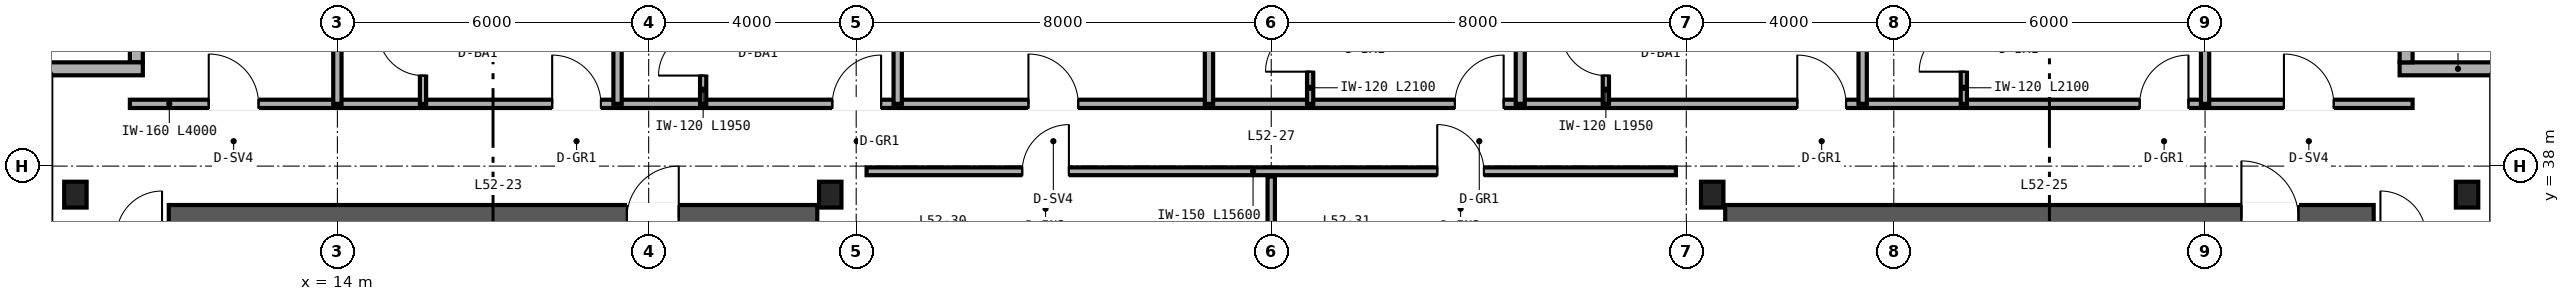
"""IFC4 building model, lengths in metres.
Left out: names, types, materials, properties, quantities, classifications, styles, units other than length and angle.
Written with IfcOpenShell. Run it as: python <this file> out.ifc"""

import sys

from ifc_helpers import new_model, si_unit, direction, frame, frame_2d, origin, origin_2d, place, context, subcontext, project, spatial, rectangle, i_section, extrude, source, transform, mapped, element, fill, save


model = new_model("IFC4")
c1 = context("Model", 3, precision=1e-05, world=origin(), true_north=direction((0.0, 1.0)))
c2 = subcontext(c1, "Body", "Model", "MODEL_VIEW")
j1 = project(units=[si_unit("LENGTHUNIT", "METRE"), si_unit("PLANEANGLEUNIT", "RADIAN")], contexts=[c1])
p1 = place(None, origin())
s1 = spatial("IfcSite", under=j1, at=p1, CompositionType="ELEMENT")
p2 = place(p1, origin())
s2 = spatial("IfcBuilding", under=s1, at=p2, CompositionType="ELEMENT")
p3 = place(p2, frame((0.0, 0.0, 206.4)))
s3 = spatial("IfcBuildingStorey", under=s2, at=p3, CompositionType="ELEMENT", Elevation=206.4)
p4 = place(p3, frame((10.75, 37.0, 0.0), z_axis=(0.0, 0.0, 1.0), x_axis=(1.0, 0.0, 0.0)))
e1 = element("IfcWall", 1, at=p4, inside=s3, PredefinedType="SHEAR", context=c2, shape_type="SweptSolid", body=[
    extrude(rectangle(XDim=12.5, YDim=0.5, at=frame_2d((6.25, 0.0))), origin(), (0.0, 0.0, 1.0), 3.37),
])
p5 = place(p4, frame((8.83, 0.0, 0.0)))
e2 = element("IfcOpeningElement", 2, at=p5, cuts=e1, PredefinedType="OPENING", context=c2, shape_type="SweptSolid", body=[
    extrude(rectangle(XDim=1.0, YDim=2.15, at=frame_2d((0.5, 1.075))), frame((0.0, 0.26, 0.0), z_axis=(0.0, -1.0, 0.0), x_axis=(1.0, 0.0, 0.0)), (0.0, 0.0, 1.0), 0.52),
])
p6 = place(p3, frame((40.75, 37.0, 0.0), z_axis=(0.0, 0.0, 1.0), x_axis=(1.0, 0.0, 0.0)))
e3 = element("IfcWall", 3, at=p6, inside=s3, PredefinedType="SHEAR", context=c2, shape_type="SweptSolid", body=[
    extrude(rectangle(XDim=12.5, YDim=0.5, at=frame_2d((6.25, 0.0))), origin(), (0.0, 0.0, 1.0), 3.37),
])
p7 = place(p6, frame((9.95, 0.0, 0.0)))
e4 = element("IfcOpeningElement", 4, at=p7, cuts=e3, PredefinedType="OPENING", context=c2, shape_type="SweptSolid", body=[
    extrude(rectangle(XDim=1.1, YDim=2.15, at=frame_2d((0.55, 1.075))), frame((0.0, 0.26, 0.0), z_axis=(0.0, -1.0, 0.0), x_axis=(1.0, 0.0, 0.0)), (0.0, 0.0, 1.0), 0.52),
])
m1 = source(origin(), c2, "Body", "SweptSolid", [
    extrude(i_section(OverallWidth=0.432, OverallDepth=0.498, WebThickness=0.056, FlangeThickness=0.089, FilletRadius=0.025, at=origin_2d()), origin(), (0.0, 0.0, 1.0), 3.37),
])
for number, where, z_axis, x_axis in (
    (5, (8.95, 37.45, 0.0), (0.0, 0.0, 1.0), (1.0, 0.0, 0.0)),
    (6, (23.5, 37.45, 0.0), (0.0, 0.0, 1.0), (1.0, 0.0, 0.0)),
    (7, (40.5, 37.45, 0.0), (0.0, 0.0, 1.0), (1.0, 0.0, 0.0)),
    (8, (55.05, 37.45, 0.0), (0.0, 0.0, 1.0), (1.0, 0.0, 0.0)),
):
    element("IfcColumn", number, at=place(p3, frame(where, z_axis=z_axis, x_axis=x_axis)), inside=s3, PredefinedType="COLUMN", context=c2, shape_type="MappedRepresentation", body=[
        mapped(m1, transform((0.0, 0.0, 0.0), scale=1.0)),
    ])
p8 = place(p3, frame((56.0, 39.875, 0.0), z_axis=(0.0, 0.0, 1.0), x_axis=(-1.0, 0.0, 0.0)))
e9 = element("IfcWall", 9, at=p8, inside=s3, PredefinedType="SOLIDWALL", context=c2, shape_type="SweptSolid", body=[
    extrude(rectangle(XDim=2.25, YDim=0.25, at=frame_2d((1.125, 0.0))), origin(), (0.0, 0.0, 1.0), 3.37),
])
for number, where, z_axis, x_axis in (
    (10, (53.875, 40.0, 0.0), (0.0, 0.0, 1.0), (0.0, 1.0, 0.0)),
    (11, (10.125, 42.0, 0.0), (0.0, 0.0, 1.0), (0.0, -1.0, 0.0)),
):
    element("IfcWall", number, at=place(p3, frame(where, z_axis=z_axis, x_axis=x_axis)), inside=s3, PredefinedType="SOLIDWALL", context=c2, shape_type="SweptSolid", body=[
        extrude(rectangle(XDim=2.0, YDim=0.25, at=frame_2d((1.0, 0.0))), origin(), (0.0, 0.0, 1.0), 3.37),
    ])
p9 = place(p3, frame((10.25, 39.875, 0.0), z_axis=(0.0, 0.0, 1.0), x_axis=(-1.0, 0.0, 0.0)))
e12 = element("IfcWall", 12, at=p9, inside=s3, PredefinedType="SOLIDWALL", context=c2, shape_type="SweptSolid", body=[
    extrude(rectangle(XDim=2.25, YDim=0.25, at=frame_2d((1.125, 0.0))), origin(), (0.0, 0.0, 1.0), 3.37),
])
p10 = place(p3, frame((24.2, 37.9, 0.0), z_axis=(0.0, 0.0, 1.0), x_axis=(1.0, 0.0, 0.0)))
e13 = element("IfcWall", 13, at=p10, inside=s3, PredefinedType="PARTITIONING", context=c2, shape_type="SweptSolid", body=[
    extrude(rectangle(XDim=15.6, YDim=0.15, at=frame_2d((7.8, 0.0))), origin(), (0.0, 0.0, 1.0), 3.37),
])
p11 = place(p10, frame((3.0, 0.0, 0.0)))
e14 = element("IfcOpeningElement", 14, at=p11, cuts=e13, PredefinedType="OPENING", context=c2, shape_type="SweptSolid", body=[
    extrude(rectangle(XDim=0.9, YDim=2.15, at=frame_2d((0.45, 1.075))), frame((0.0, 0.085, 0.0), z_axis=(0.0, -1.0, 0.0), x_axis=(1.0, 0.0, 0.0)), (0.0, 0.0, 1.0), 0.17),
])
p12 = place(p10, frame((11.0, 0.0, 0.0)))
e15 = element("IfcOpeningElement", 15, at=p12, cuts=e13, PredefinedType="OPENING", context=c2, shape_type="SweptSolid", body=[
    extrude(rectangle(XDim=0.9, YDim=2.15, at=frame_2d((0.45, 1.075))), frame((0.0, 0.085, 0.0), z_axis=(0.0, -1.0, 0.0), x_axis=(1.0, 0.0, 0.0)), (0.0, 0.0, 1.0), 0.17),
])
p13 = place(p3, frame((32.0, 36.12, 0.0), z_axis=(0.0, 0.0, 1.0), x_axis=(0.0, 1.0, 0.0)))
e16 = element("IfcWall", 16, at=p13, inside=s3, PredefinedType="PARTITIONING", context=c2, shape_type="SweptSolid", body=[
    extrude(rectangle(XDim=1.68, YDim=0.142, at=frame_2d((0.84, 0.0))), origin(), (0.0, 0.0, 1.0), 3.37),
])
p14 = place(p3, frame((10.0, 39.2, 0.0), z_axis=(0.0, 0.0, 1.0), x_axis=(1.0, 0.0, 0.0)))
e17 = element("IfcWall", 17, at=p14, inside=s3, PredefinedType="PARTITIONING", context=c2, shape_type="SweptSolid", body=[
    extrude(rectangle(XDim=4.0, YDim=0.16, at=frame_2d((2.0, 0.0))), origin(), (0.0, 0.0, 1.0), 3.37),
])
p15 = place(p14, frame((1.52, 0.0, 0.0)))
e18 = element("IfcOpeningElement", 18, at=p15, cuts=e17, PredefinedType="OPENING", context=c2, shape_type="SweptSolid", body=[
    extrude(rectangle(XDim=0.96, YDim=2.15, at=frame_2d((0.48, 1.075))), frame((0.0, 0.09, 0.0), z_axis=(0.0, -1.0, 0.0), x_axis=(1.0, 0.0, 0.0)), (0.0, 0.0, 1.0), 0.18),
])
p16 = place(p3, frame((50.0, 39.2, 0.0), z_axis=(0.0, 0.0, 1.0), x_axis=(1.0, 0.0, 0.0)))
e19 = element("IfcWall", 19, at=p16, inside=s3, PredefinedType="PARTITIONING", context=c2, shape_type="SweptSolid", body=[
    extrude(rectangle(XDim=4.0, YDim=0.16, at=frame_2d((2.0, 0.0))), origin(), (0.0, 0.0, 1.0), 3.37),
])
p17 = place(p16, frame((1.52, 0.0, 0.0)))
e20 = element("IfcOpeningElement", 20, at=p17, cuts=e19, PredefinedType="OPENING", context=c2, shape_type="SweptSolid", body=[
    extrude(rectangle(XDim=0.96, YDim=2.15, at=frame_2d((0.48, 1.075))), frame((0.0, 0.09, 0.0), z_axis=(0.0, -1.0, 0.0), x_axis=(1.0, 0.0, 0.0)), (0.0, 0.0, 1.0), 0.18),
])
p18 = place(p3, frame((14.0, 39.2, 0.0), z_axis=(0.0, 0.0, 1.0), x_axis=(1.0, 0.0, 0.0)))
e21 = element("IfcWall", 21, at=p18, inside=s3, PredefinedType="PARTITIONING", context=c2, shape_type="SweptSolid", body=[
    extrude(rectangle(XDim=36.0, YDim=0.16, at=frame_2d((18.0, 0.0))), origin(), (0.0, 0.0, 1.0), 2.913),
])
p19 = place(p18, frame((4.14, 0.0, 0.0)))
e22 = element("IfcOpeningElement", 22, at=p19, cuts=e21, PredefinedType="OPENING", context=c2, shape_type="SweptSolid", body=[
    extrude(rectangle(XDim=0.94, YDim=2.15, at=frame_2d((0.47, 1.075))), frame((0.0, 0.09, 0.0), z_axis=(0.0, -1.0, 0.0), x_axis=(1.0, 0.0, 0.0)), (0.0, 0.0, 1.0), 0.18),
])
p20 = place(p18, frame((9.54, 0.0, 0.0)))
e23 = element("IfcOpeningElement", 23, at=p20, cuts=e21, PredefinedType="OPENING", context=c2, shape_type="SweptSolid", body=[
    extrude(rectangle(XDim=0.94, YDim=2.15, at=frame_2d((0.47, 1.075))), frame((0.0, 0.09, 0.0), z_axis=(0.0, -1.0, 0.0), x_axis=(1.0, 0.0, 0.0)), (0.0, 0.0, 1.0), 0.18),
])
p21 = place(p18, frame((13.32, 0.0, 0.0)))
e24 = element("IfcOpeningElement", 24, at=p21, cuts=e21, PredefinedType="OPENING", context=c2, shape_type="SweptSolid", body=[
    extrude(rectangle(XDim=0.96, YDim=2.15, at=frame_2d((0.48, 1.075))), frame((0.0, 0.09, 0.0), z_axis=(0.0, -1.0, 0.0), x_axis=(1.0, 0.0, 0.0)), (0.0, 0.0, 1.0), 0.18),
])
p22 = place(p18, frame((21.54, 0.0, 0.0)))
e25 = element("IfcOpeningElement", 25, at=p22, cuts=e21, PredefinedType="OPENING", context=c2, shape_type="SweptSolid", body=[
    extrude(rectangle(XDim=0.94, YDim=2.15, at=frame_2d((0.47, 1.075))), frame((0.0, 0.09, 0.0), z_axis=(0.0, -1.0, 0.0), x_axis=(1.0, 0.0, 0.0)), (0.0, 0.0, 1.0), 0.18),
])
p23 = place(p18, frame((28.14, 0.0, 0.0)))
e26 = element("IfcOpeningElement", 26, at=p23, cuts=e21, PredefinedType="OPENING", context=c2, shape_type="SweptSolid", body=[
    extrude(rectangle(XDim=0.94, YDim=2.15, at=frame_2d((0.47, 1.075))), frame((0.0, 0.09, 0.0), z_axis=(0.0, -1.0, 0.0), x_axis=(1.0, 0.0, 0.0)), (0.0, 0.0, 1.0), 0.18),
])
p24 = place(p18, frame((34.74, 0.0, 0.0)))
e27 = element("IfcOpeningElement", 27, at=p24, cuts=e21, PredefinedType="OPENING", context=c2, shape_type="SweptSolid", body=[
    extrude(rectangle(XDim=0.94, YDim=2.15, at=frame_2d((0.47, 1.075))), frame((0.0, 0.09, 0.0), z_axis=(0.0, -1.0, 0.0), x_axis=(1.0, 0.0, 0.0)), (0.0, 0.0, 1.0), 0.18),
])
for number, where, z_axis, x_axis in (
    (28, (14.0, 39.2, 0.0), (0.0, 0.0, 1.0), (0.0, 1.0, 0.0)),
    (29, (50.0, 39.2, 0.0), (0.0, 0.0, 1.0), (0.0, 1.0, 0.0)),
    (30, (19.4, 39.2, 0.0), (0.0, 0.0, 1.0), (0.0, 1.0, 0.0)),
):
    element("IfcWall", number, at=place(p3, frame(where, z_axis=z_axis, x_axis=x_axis)), inside=s3, PredefinedType="PARTITIONING", context=c2, shape_type="SweptSolid", body=[
        extrude(rectangle(XDim=6.44, YDim=0.16, at=frame_2d((3.22, 0.0))), origin(), (0.0, 0.0, 1.0), 2.677),
    ])
p25 = place(p3, frame((15.65, 39.2, 0.0), z_axis=(0.0, 0.0, 1.0), x_axis=(0.0, 1.0, 0.0)))
e31 = element("IfcWall", 31, at=p25, inside=s3, PredefinedType="PARTITIONING", context=c2, shape_type="SweptSolid", body=[
    extrude(rectangle(XDim=1.95, YDim=0.12, at=frame_2d((0.975, 0.0))), origin(), (0.0, 0.0, 1.0), 3.37),
])
p26 = place(p25, frame((0.545, 0.0, 0.0)))
e32 = element("IfcOpeningElement", 32, at=p26, cuts=e31, PredefinedType="OPENING", context=c2, shape_type="SweptSolid", body=[
    extrude(rectangle(XDim=0.86, YDim=2.1, at=frame_2d((0.43, 1.05))), frame((0.0, 0.07, 0.0), z_axis=(0.0, -1.0, 0.0), x_axis=(1.0, 0.0, 0.0)), (0.0, 0.0, 1.0), 0.14),
])
p27 = place(p3, frame((24.8, 39.2, 0.0), z_axis=(0.0, 0.0, 1.0), x_axis=(0.0, 1.0, 0.0)))
e33 = element("IfcWall", 33, at=p27, inside=s3, PredefinedType="PARTITIONING", context=c2, shape_type="SweptSolid", body=[
    extrude(rectangle(XDim=6.44, YDim=0.16, at=frame_2d((3.22, 0.0))), origin(), (0.0, 0.0, 1.0), 2.443),
])
p28 = place(p3, frame((21.05, 39.2, 0.0), z_axis=(0.0, 0.0, 1.0), x_axis=(0.0, 1.0, 0.0)))
e34 = element("IfcWall", 34, at=p28, inside=s3, PredefinedType="PARTITIONING", context=c2, shape_type="SweptSolid", body=[
    extrude(rectangle(XDim=1.95, YDim=0.12, at=frame_2d((0.975, 0.0))), origin(), (0.0, 0.0, 1.0), 3.37),
])
p29 = place(p28, frame((0.545, 0.0, 0.0)))
e35 = element("IfcOpeningElement", 35, at=p29, cuts=e34, PredefinedType="OPENING", context=c2, shape_type="SweptSolid", body=[
    extrude(rectangle(XDim=0.86, YDim=2.1, at=frame_2d((0.43, 1.05))), frame((0.0, 0.07, 0.0), z_axis=(0.0, -1.0, 0.0), x_axis=(1.0, 0.0, 0.0)), (0.0, 0.0, 1.0), 0.14),
])
p30 = place(p3, frame((30.8, 39.2, 0.0), z_axis=(0.0, 0.0, 1.0), x_axis=(0.0, 1.0, 0.0)))
e36 = element("IfcWall", 36, at=p30, inside=s3, PredefinedType="PARTITIONING", context=c2, shape_type="SweptSolid", body=[
    extrude(rectangle(XDim=6.44, YDim=0.16, at=frame_2d((3.22, 0.0))), origin(), (0.0, 0.0, 1.0), 2.443),
])
p31 = place(p3, frame((36.8, 39.2, 0.0), z_axis=(0.0, 0.0, 1.0), x_axis=(0.0, 1.0, 0.0)))
e37 = element("IfcWall", 37, at=p31, inside=s3, PredefinedType="PARTITIONING", context=c2, shape_type="SweptSolid", body=[
    extrude(rectangle(XDim=6.44, YDim=0.175, at=frame_2d((3.22, 0.0))), origin(), (0.0, 0.0, 1.0), 2.443),
])
p32 = place(p3, frame((32.75, 39.2, 0.0), z_axis=(0.0, 0.0, 1.0), x_axis=(0.0, 1.0, 0.0)))
e38 = element("IfcWall", 38, at=p32, inside=s3, PredefinedType="PARTITIONING", context=c2, shape_type="SweptSolid", body=[
    extrude(rectangle(XDim=2.1, YDim=0.12, at=frame_2d((1.05, 0.0))), origin(), (0.0, 0.0, 1.0), 3.37),
])
p33 = place(p32, frame((0.62, 0.0, 0.0)))
e39 = element("IfcOpeningElement", 39, at=p33, cuts=e38, PredefinedType="OPENING", context=c2, shape_type="SweptSolid", body=[
    extrude(rectangle(XDim=0.86, YDim=2.1, at=frame_2d((0.43, 1.05))), frame((0.0, 0.07, 0.0), z_axis=(0.0, -1.0, 0.0), x_axis=(1.0, 0.0, 0.0)), (0.0, 0.0, 1.0), 0.14),
])
p34 = place(p3, frame((43.4, 39.2, 0.0), z_axis=(0.0, 0.0, 1.0), x_axis=(0.0, 1.0, 0.0)))
e40 = element("IfcWall", 40, at=p34, inside=s3, PredefinedType="PARTITIONING", context=c2, shape_type="SweptSolid", body=[
    extrude(rectangle(XDim=6.44, YDim=0.16, at=frame_2d((3.22, 0.0))), origin(), (0.0, 0.0, 1.0), 2.833),
])
p35 = place(p3, frame((38.45, 39.2, 0.0), z_axis=(0.0, 0.0, 1.0), x_axis=(0.0, 1.0, 0.0)))
e41 = element("IfcWall", 41, at=p35, inside=s3, PredefinedType="PARTITIONING", context=c2, shape_type="SweptSolid", body=[
    extrude(rectangle(XDim=1.95, YDim=0.12, at=frame_2d((0.975, 0.0))), origin(), (0.0, 0.0, 1.0), 3.37),
])
p36 = place(p35, frame((0.545, 0.0, 0.0)))
e42 = element("IfcOpeningElement", 42, at=p36, cuts=e41, PredefinedType="OPENING", context=c2, shape_type="SweptSolid", body=[
    extrude(rectangle(XDim=0.86, YDim=2.1, at=frame_2d((0.43, 1.05))), frame((0.0, 0.07, 0.0), z_axis=(0.0, -1.0, 0.0), x_axis=(1.0, 0.0, 0.0)), (0.0, 0.0, 1.0), 0.14),
])
p37 = place(p3, frame((45.35, 39.2, 0.0), z_axis=(0.0, 0.0, 1.0), x_axis=(0.0, 1.0, 0.0)))
e43 = element("IfcWall", 43, at=p37, inside=s3, PredefinedType="PARTITIONING", context=c2, shape_type="SweptSolid", body=[
    extrude(rectangle(XDim=2.1, YDim=0.12, at=frame_2d((1.05, 0.0))), origin(), (0.0, 0.0, 1.0), 3.37),
])
p38 = place(p37, frame((0.62, 0.0, 0.0)))
e44 = element("IfcOpeningElement", 44, at=p38, cuts=e43, PredefinedType="OPENING", context=c2, shape_type="SweptSolid", body=[
    extrude(rectangle(XDim=0.86, YDim=2.1, at=frame_2d((0.43, 1.05))), frame((0.0, 0.07, 0.0), z_axis=(0.0, -1.0, 0.0), x_axis=(1.0, 0.0, 0.0)), (0.0, 0.0, 1.0), 0.14),
])
m2 = source(origin(), c2, "Body", "SweptSolid", [
    extrude(rectangle(XDim=1.0, YDim=2.15, at=frame_2d((0.5, 1.075))), frame((0.0, 0.025, 0.0), z_axis=(0.0, -1.0, 0.0), x_axis=(1.0, 0.0, 0.0)), (0.0, 0.0, 1.0), 0.05),
])
p39 = place(p5, origin())
e45 = element("IfcDoor", 45, at=p39, inside=s3, OperationType="SINGLE_SWING_RIGHT", PredefinedType="DOOR", context=c2, shape_type="MappedRepresentation", body=[
    mapped(m2, transform((0.0, 0.0, 0.0), scale=1.0)),
])
fill(e2, e45)
m3 = source(origin(), c2, "Body", "SweptSolid", [
    extrude(rectangle(XDim=1.1, YDim=2.15, at=frame_2d((0.55, 1.075))), frame((0.0, 0.025, 0.0), z_axis=(0.0, -1.0, 0.0), x_axis=(1.0, 0.0, 0.0)), (0.0, 0.0, 1.0), 0.05),
])
p40 = place(p7, origin())
e46 = element("IfcDoor", 46, at=p40, inside=s3, OperationType="SINGLE_SWING_LEFT", PredefinedType="DOOR", context=c2, shape_type="MappedRepresentation", body=[
    mapped(m3, transform((0.0, 0.0, 0.0), scale=1.0)),
])
fill(e4, e46)
m4 = source(origin(), c2, "Body", "SweptSolid", [
    extrude(rectangle(XDim=0.9, YDim=2.15, at=frame_2d((0.45, 1.075))), frame((0.0, 0.025, 0.0), z_axis=(0.0, -1.0, 0.0), x_axis=(1.0, 0.0, 0.0)), (0.0, 0.0, 1.0), 0.05),
])
p41 = place(p11, origin())
e47 = element("IfcDoor", 47, at=p41, inside=s3, OperationType="SINGLE_SWING_RIGHT", PredefinedType="DOOR", context=c2, shape_type="MappedRepresentation", body=[
    mapped(m4, transform((0.0, 0.0, 0.0), scale=1.0)),
])
fill(e14, e47)
p42 = place(p12, origin())
e48 = element("IfcDoor", 48, at=p42, inside=s3, OperationType="SINGLE_SWING_LEFT", PredefinedType="DOOR", context=c2, shape_type="MappedRepresentation", body=[
    mapped(m4, transform((0.0, 0.0, 0.0), scale=1.0)),
])
fill(e15, e48)
m5 = source(origin(), c2, "Body", "SweptSolid", [
    extrude(rectangle(XDim=0.96, YDim=2.15, at=frame_2d((0.48, 1.075))), frame((0.0, 0.025, 0.0), z_axis=(0.0, -1.0, 0.0), x_axis=(1.0, 0.0, 0.0)), (0.0, 0.0, 1.0), 0.05),
])
p43 = place(p15, origin())
e49 = element("IfcDoor", 49, at=p43, inside=s3, OperationType="SINGLE_SWING_LEFT", PredefinedType="DOOR", context=c2, shape_type="MappedRepresentation", body=[
    mapped(m5, transform((0.0, 0.0, 0.0), scale=1.0)),
])
fill(e18, e49)
p44 = place(p17, origin())
e50 = element("IfcDoor", 50, at=p44, inside=s3, OperationType="SINGLE_SWING_LEFT", PredefinedType="DOOR", context=c2, shape_type="MappedRepresentation", body=[
    mapped(m5, transform((0.0, 0.0, 0.0), scale=1.0)),
])
fill(e20, e50)
m6 = source(origin(), c2, "Body", "SweptSolid", [
    extrude(rectangle(XDim=0.86, YDim=2.1, at=frame_2d((0.43, 1.05))), frame((0.0, 0.025, 0.0), z_axis=(0.0, -1.0, 0.0), x_axis=(1.0, 0.0, 0.0)), (0.0, 0.0, 1.0), 0.05),
])
p45 = place(p26, origin())
e51 = element("IfcDoor", 51, at=p45, inside=s3, OperationType="SINGLE_SWING_RIGHT", PredefinedType="DOOR", context=c2, shape_type="MappedRepresentation", body=[
    mapped(m6, transform((0.0, 0.0, 0.0), scale=1.0)),
])
fill(e32, e51)
p46 = place(p29, origin())
e52 = element("IfcDoor", 52, at=p46, inside=s3, OperationType="SINGLE_SWING_LEFT", PredefinedType="DOOR", context=c2, shape_type="MappedRepresentation", body=[
    mapped(m6, transform((0.0, 0.0, 0.0), scale=1.0)),
])
fill(e35, e52)
p47 = place(p33, origin())
e53 = element("IfcDoor", 53, at=p47, inside=s3, OperationType="SINGLE_SWING_LEFT", PredefinedType="DOOR", context=c2, shape_type="MappedRepresentation", body=[
    mapped(m6, transform((0.0, 0.0, 0.0), scale=1.0)),
])
fill(e39, e53)
p48 = place(p36, origin())
e54 = element("IfcDoor", 54, at=p48, inside=s3, OperationType="SINGLE_SWING_RIGHT", PredefinedType="DOOR", context=c2, shape_type="MappedRepresentation", body=[
    mapped(m6, transform((0.0, 0.0, 0.0), scale=1.0)),
])
fill(e42, e54)
p49 = place(p38, origin())
e55 = element("IfcDoor", 55, at=p49, inside=s3, OperationType="SINGLE_SWING_LEFT", PredefinedType="DOOR", context=c2, shape_type="MappedRepresentation", body=[
    mapped(m6, transform((0.0, 0.0, 0.0), scale=1.0)),
])
fill(e44, e55)
m7 = source(origin(), c2, "Body", "SweptSolid", [
    extrude(rectangle(XDim=0.94, YDim=2.15, at=frame_2d((0.47, 1.075))), frame((0.0, 0.025, 0.0), z_axis=(0.0, -1.0, 0.0), x_axis=(1.0, 0.0, 0.0)), (0.0, 0.0, 1.0), 0.05),
])
p50 = place(p19, origin())
e56 = element("IfcDoor", 56, at=p50, inside=s3, OperationType="SINGLE_SWING_LEFT", PredefinedType="DOOR", context=c2, shape_type="MappedRepresentation", body=[
    mapped(m7, transform((0.0, 0.0, 0.0), scale=1.0)),
])
fill(e22, e56)
p51 = place(p20, origin())
e57 = element("IfcDoor", 57, at=p51, inside=s3, OperationType="SINGLE_SWING_RIGHT", PredefinedType="DOOR", context=c2, shape_type="MappedRepresentation", body=[
    mapped(m7, transform((0.0, 0.0, 0.0), scale=1.0)),
])
fill(e23, e57)
p52 = place(p21, origin())
e58 = element("IfcDoor", 58, at=p52, inside=s3, OperationType="SINGLE_SWING_LEFT", PredefinedType="DOOR", context=c2, shape_type="MappedRepresentation", body=[
    mapped(m5, transform((0.0, 0.0, 0.0), scale=1.0)),
])
fill(e24, e58)
p53 = place(p22, origin())
e59 = element("IfcDoor", 59, at=p53, inside=s3, OperationType="SINGLE_SWING_RIGHT", PredefinedType="DOOR", context=c2, shape_type="MappedRepresentation", body=[
    mapped(m7, transform((0.0, 0.0, 0.0), scale=1.0)),
])
fill(e25, e59)
p54 = place(p23, origin())
e60 = element("IfcDoor", 60, at=p54, inside=s3, OperationType="SINGLE_SWING_LEFT", PredefinedType="DOOR", context=c2, shape_type="MappedRepresentation", body=[
    mapped(m7, transform((0.0, 0.0, 0.0), scale=1.0)),
])
fill(e26, e60)
p55 = place(p24, origin())
e61 = element("IfcDoor", 61, at=p55, inside=s3, OperationType="SINGLE_SWING_RIGHT", PredefinedType="DOOR", context=c2, shape_type="MappedRepresentation", body=[
    mapped(m7, transform((0.0, 0.0, 0.0), scale=1.0)),
])
fill(e27, e61)
save(model, sys.argv[1])
